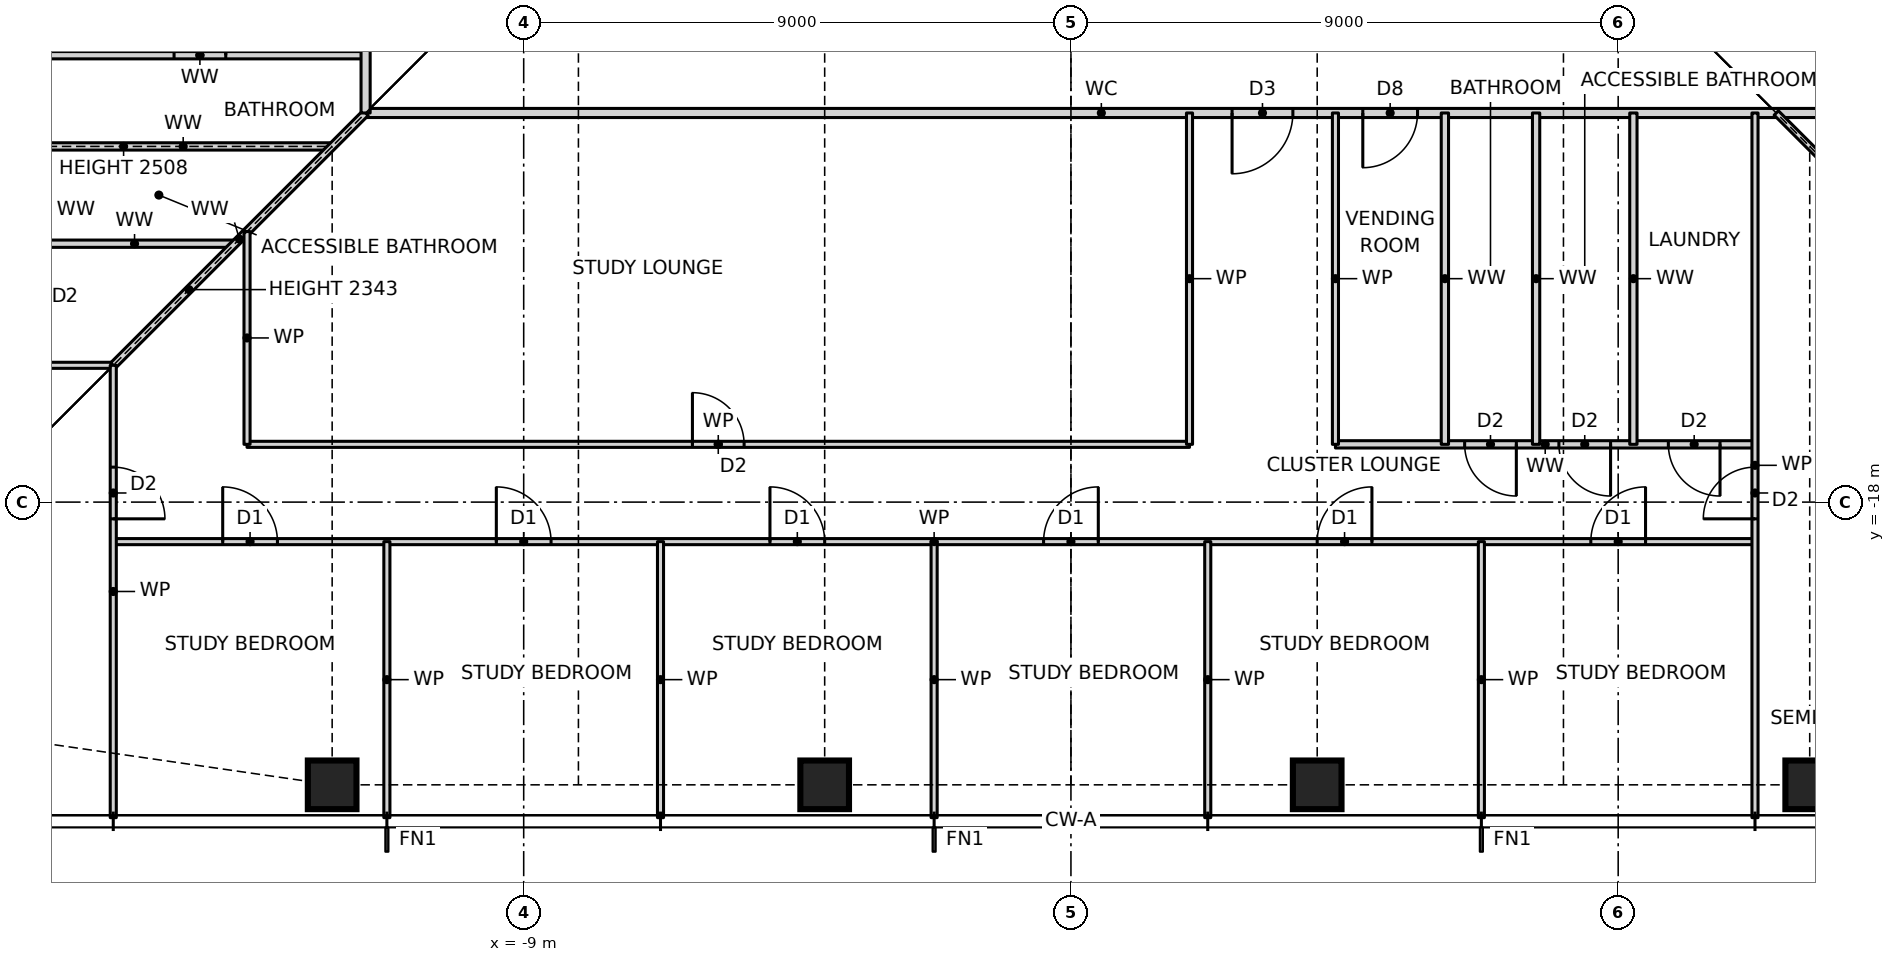
"""IFC4 building model, lengths in metres.
Left out: names, types, materials, properties, quantities, classifications, styles, units other than length and angle.
Written with IfcOpenShell. Run it as: python <this file> out.ifc"""

import sys

from ifc_helpers import new_model, si_unit, direction, frame, frame_2d, origin, origin_2d, place, context, subcontext, project, spatial, rectangle, hollow_rectangle, extrude, element, fill, save


model = new_model("IFC4")
c1 = context("Model", 3, precision=1e-05, world=origin(), true_north=direction((0.0, 1.0)))
c2 = subcontext(c1, "Body", "Model", "MODEL_VIEW")
j1 = project(units=[si_unit("LENGTHUNIT", "METRE"), si_unit("PLANEANGLEUNIT", "RADIAN")], contexts=[c1])
p1 = place(None, origin())
s1 = spatial("IfcSite", under=j1, at=p1, CompositionType="ELEMENT")
p2 = place(p1, origin())
s2 = spatial("IfcBuilding", under=s1, at=p2, CompositionType="ELEMENT")
p3 = place(p2, frame((0.0, 0.0, 32.5)))
s3 = spatial("IfcBuildingStorey", under=s2, at=p3, CompositionType="ELEMENT", Elevation=32.5)
for number, where, z_axis, x_axis in (
    (1, (-12.15, -22.65, 0.0), (0.0, 0.0, 1.0), (1.0, 0.0, 0.0)),
    (2, (-4.05, -22.65, 0.0), (0.0, 0.0, 1.0), (1.0, 0.0, 0.0)),
    (3, (4.05, -22.65, 0.0), (0.0, 0.0, 1.0), (1.0, 0.0, 0.0)),
    (4, (12.15, -22.65, 0.0), (0.0, 0.0, 1.0), (1.0, 0.0, 0.0)),
):
    element("IfcColumn", number, at=place(p3, frame(where, z_axis=z_axis, x_axis=x_axis)), inside=s3, PredefinedType="COLUMN", context=c2, shape_type="SweptSolid", body=[
        extrude(hollow_rectangle(XDim=0.8, YDim=0.8, WallThickness=0.09, at=origin_2d()), origin(), (0.0, 0.0, 1.0), 3.5),
    ])
p4 = place(p3, frame((-15.75, -18.65, 0.0), z_axis=(0.0, 0.0, 1.0), x_axis=(1.0, 0.0, 0.0)))
e5 = element("IfcWall", 5, at=p4, inside=s3, PredefinedType="PARTITIONING", context=c2, shape_type="SweptSolid", body=[
    extrude(rectangle(XDim=27.0, YDim=0.1, at=frame_2d((13.5, 0.0))), origin(), (0.0, 0.0, 1.0), 3.27),
])
p5 = place(p4, frame((1.8, 0.0, 0.0)))
e6 = element("IfcOpeningElement", 6, at=p5, cuts=e5, PredefinedType="OPENING", context=c2, shape_type="SweptSolid", body=[
    extrude(rectangle(XDim=0.9, YDim=2.1, at=frame_2d((0.45, 1.05))), frame((0.0, 0.06, 0.0), z_axis=(0.0, -1.0, 0.0), x_axis=(1.0, 0.0, 0.0)), (0.0, 0.0, 1.0), 0.12),
])
p6 = place(p4, frame((6.3, 0.0, 0.0)))
e7 = element("IfcOpeningElement", 7, at=p6, cuts=e5, PredefinedType="OPENING", context=c2, shape_type="SweptSolid", body=[
    extrude(rectangle(XDim=0.9, YDim=2.1, at=frame_2d((0.45, 1.05))), frame((0.0, 0.06, 0.0), z_axis=(0.0, -1.0, 0.0), x_axis=(1.0, 0.0, 0.0)), (0.0, 0.0, 1.0), 0.12),
])
p7 = place(p4, frame((10.8, 0.0, 0.0)))
e8 = element("IfcOpeningElement", 8, at=p7, cuts=e5, PredefinedType="OPENING", context=c2, shape_type="SweptSolid", body=[
    extrude(rectangle(XDim=0.9, YDim=2.1, at=frame_2d((0.45, 1.05))), frame((0.0, 0.06, 0.0), z_axis=(0.0, -1.0, 0.0), x_axis=(1.0, 0.0, 0.0)), (0.0, 0.0, 1.0), 0.12),
])
p8 = place(p4, frame((15.3, 0.0, 0.0)))
e9 = element("IfcOpeningElement", 9, at=p8, cuts=e5, PredefinedType="OPENING", context=c2, shape_type="SweptSolid", body=[
    extrude(rectangle(XDim=0.9, YDim=2.1, at=frame_2d((0.45, 1.05))), frame((0.0, 0.06, 0.0), z_axis=(0.0, -1.0, 0.0), x_axis=(1.0, 0.0, 0.0)), (0.0, 0.0, 1.0), 0.12),
])
p9 = place(p4, frame((19.8, 0.0, 0.0)))
e10 = element("IfcOpeningElement", 10, at=p9, cuts=e5, PredefinedType="OPENING", context=c2, shape_type="SweptSolid", body=[
    extrude(rectangle(XDim=0.9, YDim=2.1, at=frame_2d((0.45, 1.05))), frame((0.0, 0.06, 0.0), z_axis=(0.0, -1.0, 0.0), x_axis=(1.0, 0.0, 0.0)), (0.0, 0.0, 1.0), 0.12),
])
p10 = place(p4, frame((24.3, 0.0, 0.0)))
e11 = element("IfcOpeningElement", 11, at=p10, cuts=e5, PredefinedType="OPENING", context=c2, shape_type="SweptSolid", body=[
    extrude(rectangle(XDim=0.9, YDim=2.1, at=frame_2d((0.45, 1.05))), frame((0.0, 0.06, 0.0), z_axis=(0.0, -1.0, 0.0), x_axis=(1.0, 0.0, 0.0)), (0.0, 0.0, 1.0), 0.12),
])
p11 = place(p3, frame((-13.55, -17.05, 0.0), z_axis=(0.0, 0.0, 1.0), x_axis=(1.0, 0.0, 0.0)))
e12 = element("IfcWall", 12, at=p11, inside=s3, PredefinedType="PARTITIONING", context=c2, shape_type="SweptSolid", body=[
    extrude(rectangle(XDim=15.5, YDim=0.1, at=frame_2d((7.75, 0.0))), origin(), (0.0, 0.0, 1.0), 3.27),
])
p12 = place(p11, frame((7.325, 0.0, 0.0)))
e13 = element("IfcOpeningElement", 13, at=p12, cuts=e12, PredefinedType="OPENING", context=c2, shape_type="SweptSolid", body=[
    extrude(rectangle(XDim=0.85, YDim=2.1, at=frame_2d((0.425, 1.05))), frame((0.0, 0.06, 0.0), z_axis=(0.0, -1.0, 0.0), x_axis=(1.0, 0.0, 0.0)), (0.0, 0.0, 1.0), 0.12),
])
p13 = place(p3, frame((4.35, -17.05, 0.0), z_axis=(0.0, 0.0, 1.0), x_axis=(1.0, 0.0, 0.0)))
e14 = element("IfcWall", 14, at=p13, inside=s3, PredefinedType="PARTITIONING", context=c2, shape_type="SweptSolid", body=[
    extrude(rectangle(XDim=6.9, YDim=0.12, at=frame_2d((3.45, 0.0))), origin(), (0.0, 0.0, 1.0), 3.27),
])
p14 = place(p13, frame((2.125, 0.0, 0.0)))
e15 = element("IfcOpeningElement", 15, at=p14, cuts=e14, PredefinedType="OPENING", context=c2, shape_type="SweptSolid", body=[
    extrude(rectangle(XDim=0.85, YDim=2.1, at=frame_2d((0.425, 1.05))), frame((0.0, 0.07, 0.0), z_axis=(0.0, -1.0, 0.0), x_axis=(1.0, 0.0, 0.0)), (0.0, 0.0, 1.0), 0.14),
])
p15 = place(p13, frame((3.675, 0.0, 0.0)))
e16 = element("IfcOpeningElement", 16, at=p15, cuts=e14, PredefinedType="OPENING", context=c2, shape_type="SweptSolid", body=[
    extrude(rectangle(XDim=0.85, YDim=2.1, at=frame_2d((0.425, 1.05))), frame((0.0, 0.07, 0.0), z_axis=(0.0, -1.0, 0.0), x_axis=(1.0, 0.0, 0.0)), (0.0, 0.0, 1.0), 0.14),
])
p16 = place(p13, frame((5.475, 0.0, 0.0)))
e17 = element("IfcOpeningElement", 17, at=p16, cuts=e14, PredefinedType="OPENING", context=c2, shape_type="SweptSolid", body=[
    extrude(rectangle(XDim=0.85, YDim=2.1, at=frame_2d((0.425, 1.05))), frame((0.0, 0.07, 0.0), z_axis=(0.0, -1.0, 0.0), x_axis=(1.0, 0.0, 0.0)), (0.0, 0.0, 1.0), 0.14),
])
p17 = place(p3, frame((-23.19, -15.75, 0.0), z_axis=(0.0, 0.0, 1.0), x_axis=(1.0, 0.0, 0.0)))
e18 = element("IfcWall", 18, at=p17, inside=s3, PredefinedType="PARTITIONING", context=c2, shape_type="SweptSolid", body=[
    extrude(rectangle(XDim=7.44, YDim=0.1, at=frame_2d((3.72, 0.0))), origin(), (0.0, 0.0, 1.0), 3.27),
])
p18 = place(p3, frame((-17.05, -13.75, 0.0), z_axis=(0.0, 0.0, 1.0), x_axis=(1.0, 0.0, 0.0)))
e19 = element("IfcWall", 19, at=p18, inside=s3, PredefinedType="PARTITIONING", context=c2, shape_type="SweptSolid", body=[
    extrude(rectangle(XDim=3.3, YDim=0.12, at=frame_2d((1.65, 0.0))), origin(), (0.0, 0.0, 1.0), 3.27),
])
p19 = place(p3, frame((-17.05, -12.15, 0.0), z_axis=(0.0, 0.0, 1.0), x_axis=(1.0, 0.0, 0.0)))
e20 = element("IfcWall", 20, at=p19, inside=s3, PredefinedType="PARTITIONING", context=c2, shape_type="SweptSolid", body=[
    extrude(rectangle(XDim=4.9, YDim=0.12, at=frame_2d((2.45, 0.0))), origin(), (0.0, 0.0, 1.0), 2.508),
])
p20 = place(p3, frame((-11.6, -11.6, 0.0), z_axis=(0.0, 0.0, 1.0), x_axis=(1.0, 0.0, 0.0)))
e21 = element("IfcWall", 21, at=p20, inside=s3, PredefinedType="PARTITIONING", context=c2, shape_type="SweptSolid", body=[
    extrude(rectangle(XDim=24.2, YDim=0.15, at=frame_2d((12.1, 0.0))), origin(), (0.0, 0.0, 1.0), 3.27),
])
p21 = place(p20, frame((14.25, 0.0, 0.0)))
e22 = element("IfcOpeningElement", 22, at=p21, cuts=e21, PredefinedType="OPENING", context=c2, shape_type="SweptSolid", body=[
    extrude(rectangle(XDim=1.0, YDim=2.1, at=frame_2d((0.5, 1.05))), frame((0.0, 0.085, 0.0), z_axis=(0.0, -1.0, 0.0), x_axis=(1.0, 0.0, 0.0)), (0.0, 0.0, 1.0), 0.17),
])
p22 = place(p20, frame((16.4, 0.0, 0.0)))
e23 = element("IfcOpeningElement", 23, at=p22, cuts=e21, PredefinedType="OPENING", context=c2, shape_type="SweptSolid", body=[
    extrude(rectangle(XDim=0.9, YDim=2.1, at=frame_2d((0.45, 1.05))), frame((0.0, 0.085, 0.0), z_axis=(0.0, -1.0, 0.0), x_axis=(1.0, 0.0, 0.0)), (0.0, 0.0, 1.0), 0.17),
])
p23 = place(p3, frame((-17.05, -10.65, 0.0), z_axis=(0.0, 0.0, 1.0), x_axis=(1.0, 0.0, 0.0)))
e24 = element("IfcWall", 24, at=p23, inside=s3, PredefinedType="PARTITIONING", context=c2, shape_type="SweptSolid", body=[
    extrude(rectangle(XDim=5.45, YDim=0.12, at=frame_2d((2.725, 0.0))), origin(), (0.0, 0.0, 1.0), 3.27),
])
p24 = place(p23, frame((2.3, 0.0, 0.0)))
e25 = element("IfcOpeningElement", 25, at=p24, cuts=e24, PredefinedType="OPENING", context=c2, shape_type="SweptSolid", body=[
    extrude(rectangle(XDim=0.85, YDim=2.1, at=frame_2d((0.425, 1.05))), frame((0.0, 0.07, 0.0), z_axis=(0.0, -1.0, 0.0), x_axis=(1.0, 0.0, 0.0)), (0.0, 0.0, 1.0), 0.14),
])
p25 = place(p3, frame((-15.75, -15.75, 0.0), z_axis=(0.0, 0.0, 1.0), x_axis=(0.707106781187, 0.707106781187, 0.0)))
e26 = element("IfcWall", 26, at=p25, inside=s3, PredefinedType="PARTITIONING", context=c2, shape_type="SweptSolid", body=[
    extrude(rectangle(XDim=5.869, YDim=0.12, at=frame_2d((2.935, 0.0))), origin(), (0.0, 0.0, 1.0), 2.343),
])
p26 = place(p3, frame((11.25, -23.19, 0.0), z_axis=(0.0, 0.0, 1.0), x_axis=(0.0, 1.0, 0.0)))
e27 = element("IfcWall", 27, at=p26, inside=s3, PredefinedType="PARTITIONING", context=c2, shape_type="SweptSolid", body=[
    extrude(rectangle(XDim=11.59, YDim=0.1, at=frame_2d((5.795, 0.0))), origin(), (0.0, 0.0, 1.0), 3.27),
])
p27 = place(p26, frame((4.915, 0.0, 0.0)))
e28 = element("IfcOpeningElement", 28, at=p27, cuts=e27, PredefinedType="OPENING", context=c2, shape_type="SweptSolid", body=[
    extrude(rectangle(XDim=0.85, YDim=2.1, at=frame_2d((0.425, 1.05))), frame((0.0, 0.06, 0.0), z_axis=(0.0, -1.0, 0.0), x_axis=(1.0, 0.0, 0.0)), (0.0, 0.0, 1.0), 0.12),
])
for number, where, z_axis, x_axis in (
    (29, (9.25, -17.05, 0.0), (0.0, 0.0, 1.0), (0.0, 1.0, 0.0)),
    (30, (7.65, -17.05, 0.0), (0.0, 0.0, 1.0), (0.0, 1.0, 0.0)),
):
    element("IfcWall", number, at=place(p3, frame(where, z_axis=z_axis, x_axis=x_axis)), inside=s3, PredefinedType="PARTITIONING", context=c2, shape_type="SweptSolid", body=[
        extrude(rectangle(XDim=5.45, YDim=0.12, at=frame_2d((2.725, 0.0))), origin(), (0.0, 0.0, 1.0), 3.27),
    ])
p28 = place(p3, frame((6.75, -23.19, 0.0), z_axis=(0.0, 0.0, 1.0), x_axis=(0.0, 1.0, 0.0)))
e31 = element("IfcWall", 31, at=p28, inside=s3, PredefinedType="PARTITIONING", context=c2, shape_type="SweptSolid", body=[
    extrude(rectangle(XDim=4.54, YDim=0.1, at=frame_2d((2.27, 0.0))), origin(), (0.0, 0.0, 1.0), 3.27),
])
p29 = place(p3, frame((6.15, -17.05, 0.0), z_axis=(0.0, 0.0, 1.0), x_axis=(0.0, 1.0, 0.0)))
e32 = element("IfcWall", 32, at=p29, inside=s3, PredefinedType="PARTITIONING", context=c2, shape_type="SweptSolid", body=[
    extrude(rectangle(XDim=5.45, YDim=0.12, at=frame_2d((2.725, 0.0))), origin(), (0.0, 0.0, 1.0), 3.27),
])
p30 = place(p3, frame((4.35, -17.05, 0.0), z_axis=(0.0, 0.0, 1.0), x_axis=(0.0, 1.0, 0.0)))
e33 = element("IfcWall", 33, at=p30, inside=s3, PredefinedType="PARTITIONING", context=c2, shape_type="SweptSolid", body=[
    extrude(rectangle(XDim=5.45, YDim=0.1, at=frame_2d((2.725, 0.0))), origin(), (0.0, 0.0, 1.0), 3.27),
])
p31 = place(p3, frame((2.25, -23.19, 0.0), z_axis=(0.0, 0.0, 1.0), x_axis=(0.0, 1.0, 0.0)))
e34 = element("IfcWall", 34, at=p31, inside=s3, PredefinedType="PARTITIONING", context=c2, shape_type="SweptSolid", body=[
    extrude(rectangle(XDim=4.54, YDim=0.1, at=frame_2d((2.27, 0.0))), origin(), (0.0, 0.0, 1.0), 3.27),
])
p32 = place(p3, frame((1.95, -17.05, 0.0), z_axis=(0.0, 0.0, 1.0), x_axis=(0.0, 1.0, 0.0)))
e35 = element("IfcWall", 35, at=p32, inside=s3, PredefinedType="PARTITIONING", context=c2, shape_type="SweptSolid", body=[
    extrude(rectangle(XDim=5.45, YDim=0.1, at=frame_2d((2.725, 0.0))), origin(), (0.0, 0.0, 1.0), 3.27),
])
for number, where, z_axis, x_axis in (
    (36, (-2.25, -23.19, 0.0), (0.0, 0.0, 1.0), (0.0, 1.0, 0.0)),
    (37, (-6.75, -23.19, 0.0), (0.0, 0.0, 1.0), (0.0, 1.0, 0.0)),
    (38, (-11.25, -23.19, 0.0), (0.0, 0.0, 1.0), (0.0, 1.0, 0.0)),
):
    element("IfcWall", number, at=place(p3, frame(where, z_axis=z_axis, x_axis=x_axis)), inside=s3, PredefinedType="PARTITIONING", context=c2, shape_type="SweptSolid", body=[
        extrude(rectangle(XDim=4.54, YDim=0.1, at=frame_2d((2.27, 0.0))), origin(), (0.0, 0.0, 1.0), 3.27),
    ])
p33 = place(p3, frame((-11.6, -11.6, 0.0), z_axis=(0.0, 0.0, 1.0), x_axis=(0.0, 1.0, 0.0)))
e39 = element("IfcWall", 39, at=p33, inside=s3, PredefinedType="PARTITIONING", context=c2, shape_type="SweptSolid", body=[
    extrude(rectangle(XDim=23.2, YDim=0.15, at=frame_2d((11.6, 0.0))), origin(), (0.0, 0.0, 1.0), 3.27),
])
p34 = place(p33, frame((1.65, 0.0, 0.0)))
e40 = element("IfcOpeningElement", 40, at=p34, cuts=e39, PredefinedType="OPENING", context=c2, shape_type="SweptSolid", body=[
    extrude(rectangle(XDim=1.0, YDim=2.1, at=frame_2d((0.5, 1.05))), frame((0.0, 0.085, 0.0), z_axis=(0.0, -1.0, 0.0), x_axis=(1.0, 0.0, 0.0)), (0.0, 0.0, 1.0), 0.17),
])
p35 = place(p3, frame((-13.55, -17.05, 0.0), z_axis=(0.0, 0.0, 1.0), x_axis=(0.0, 1.0, 0.0)))
e41 = element("IfcWall", 41, at=p35, inside=s3, PredefinedType="PARTITIONING", context=c2, shape_type="SweptSolid", body=[
    extrude(rectangle(XDim=3.5, YDim=0.1, at=frame_2d((1.75, 0.0))), origin(), (0.0, 0.0, 1.0), 3.27),
])
p36 = place(p3, frame((-15.75, -23.19, 0.0), z_axis=(0.0, 0.0, 1.0), x_axis=(0.0, 1.0, 0.0)))
e42 = element("IfcWall", 42, at=p36, inside=s3, PredefinedType="PARTITIONING", context=c2, shape_type="SweptSolid", body=[
    extrude(rectangle(XDim=7.44, YDim=0.1, at=frame_2d((3.72, 0.0))), origin(), (0.0, 0.0, 1.0), 3.27),
])
p37 = place(p36, frame((4.915, 0.0, 0.0)))
e43 = element("IfcOpeningElement", 43, at=p37, cuts=e42, PredefinedType="OPENING", context=c2, shape_type="SweptSolid", body=[
    extrude(rectangle(XDim=0.85, YDim=2.1, at=frame_2d((0.425, 1.05))), frame((0.0, 0.06, 0.0), z_axis=(0.0, -1.0, 0.0), x_axis=(1.0, 0.0, 0.0)), (0.0, 0.0, 1.0), 0.12),
])
p38 = place(p3, frame((15.75, -15.75, 0.0), z_axis=(0.0, 0.0, 1.0), x_axis=(-0.707106781187, 0.707106781187, 0.0)))
e44 = element("IfcWall", 44, at=p38, inside=s3, PredefinedType="PARTITIONING", context=c2, shape_type="SweptSolid", body=[
    extrude(rectangle(XDim=5.869, YDim=0.1, at=frame_2d((2.935, 0.0))), origin(), (0.0, 0.0, 1.0), 2.343),
])
p39 = place(p5, origin())
e45 = element("IfcDoor", 45, at=p39, inside=s3, OperationType="SINGLE_SWING_LEFT", PredefinedType="DOOR", context=c2, shape_type="SweptSolid", body=[
    extrude(rectangle(XDim=0.9, YDim=2.1, at=frame_2d((0.45, 1.05))), frame((0.0, 0.025, 0.0), z_axis=(0.0, -1.0, 0.0), x_axis=(1.0, 0.0, 0.0)), (0.0, 0.0, 1.0), 0.05),
])
fill(e6, e45)
p40 = place(p6, origin())
e46 = element("IfcDoor", 46, at=p40, inside=s3, OperationType="SINGLE_SWING_LEFT", PredefinedType="DOOR", context=c2, shape_type="SweptSolid", body=[
    extrude(rectangle(XDim=0.9, YDim=2.1, at=frame_2d((0.45, 1.05))), frame((0.0, 0.025, 0.0), z_axis=(0.0, -1.0, 0.0), x_axis=(1.0, 0.0, 0.0)), (0.0, 0.0, 1.0), 0.05),
])
fill(e7, e46)
p41 = place(p7, origin())
e47 = element("IfcDoor", 47, at=p41, inside=s3, OperationType="SINGLE_SWING_LEFT", PredefinedType="DOOR", context=c2, shape_type="SweptSolid", body=[
    extrude(rectangle(XDim=0.9, YDim=2.1, at=frame_2d((0.45, 1.05))), frame((0.0, 0.025, 0.0), z_axis=(0.0, -1.0, 0.0), x_axis=(1.0, 0.0, 0.0)), (0.0, 0.0, 1.0), 0.05),
])
fill(e8, e47)
p42 = place(p8, origin())
e48 = element("IfcDoor", 48, at=p42, inside=s3, OperationType="SINGLE_SWING_RIGHT", PredefinedType="DOOR", context=c2, shape_type="SweptSolid", body=[
    extrude(rectangle(XDim=0.9, YDim=2.1, at=frame_2d((0.45, 1.05))), frame((0.0, 0.025, 0.0), z_axis=(0.0, -1.0, 0.0), x_axis=(1.0, 0.0, 0.0)), (0.0, 0.0, 1.0), 0.05),
])
fill(e9, e48)
p43 = place(p9, origin())
e49 = element("IfcDoor", 49, at=p43, inside=s3, OperationType="SINGLE_SWING_RIGHT", PredefinedType="DOOR", context=c2, shape_type="SweptSolid", body=[
    extrude(rectangle(XDim=0.9, YDim=2.1, at=frame_2d((0.45, 1.05))), frame((0.0, 0.025, 0.0), z_axis=(0.0, -1.0, 0.0), x_axis=(1.0, 0.0, 0.0)), (0.0, 0.0, 1.0), 0.05),
])
fill(e10, e49)
p44 = place(p10, origin())
e50 = element("IfcDoor", 50, at=p44, inside=s3, OperationType="SINGLE_SWING_RIGHT", PredefinedType="DOOR", context=c2, shape_type="SweptSolid", body=[
    extrude(rectangle(XDim=0.9, YDim=2.1, at=frame_2d((0.45, 1.05))), frame((0.0, 0.025, 0.0), z_axis=(0.0, -1.0, 0.0), x_axis=(1.0, 0.0, 0.0)), (0.0, 0.0, 1.0), 0.05),
])
fill(e11, e50)
p45 = place(p21, frame((1.0, 0.0, 0.0), z_axis=(0.0, 0.0, 1.0), x_axis=(-1.0, 0.0, 0.0)))
e51 = element("IfcDoor", 51, at=p45, inside=s3, OperationType="SINGLE_SWING_RIGHT", PredefinedType="DOOR", context=c2, shape_type="SweptSolid", body=[
    extrude(rectangle(XDim=1.0, YDim=2.1, at=frame_2d((0.5, 1.05))), frame((0.0, 0.025, 0.0), z_axis=(0.0, -1.0, 0.0), x_axis=(1.0, 0.0, 0.0)), (0.0, 0.0, 1.0), 0.05),
])
fill(e22, e51)
p46 = place(p12, origin())
e52 = element("IfcDoor", 52, at=p46, inside=s3, OperationType="SINGLE_SWING_LEFT", PredefinedType="DOOR", context=c2, shape_type="SweptSolid", body=[
    extrude(rectangle(XDim=0.85, YDim=2.1, at=frame_2d((0.425, 1.05))), frame((0.0, 0.025, 0.0), z_axis=(0.0, -1.0, 0.0), x_axis=(1.0, 0.0, 0.0)), (0.0, 0.0, 1.0), 0.05),
])
fill(e13, e52)
p47 = place(p22, frame((0.9, 0.0, 0.0), z_axis=(0.0, 0.0, 1.0), x_axis=(-1.0, 0.0, 0.0)))
e53 = element("IfcDoor", 53, at=p47, inside=s3, OperationType="SINGLE_SWING_RIGHT", PredefinedType="DOOR", context=c2, shape_type="SweptSolid", body=[
    extrude(rectangle(XDim=0.9, YDim=2.1, at=frame_2d((0.45, 1.05))), frame((0.0, 0.025, 0.0), z_axis=(0.0, -1.0, 0.0), x_axis=(1.0, 0.0, 0.0)), (0.0, 0.0, 1.0), 0.05),
])
fill(e23, e53)
p48 = place(p14, frame((0.85, 0.0, 0.0), z_axis=(0.0, 0.0, 1.0), x_axis=(-1.0, 0.0, 0.0)))
e54 = element("IfcDoor", 54, at=p48, inside=s3, OperationType="SINGLE_SWING_LEFT", PredefinedType="DOOR", context=c2, shape_type="SweptSolid", body=[
    extrude(rectangle(XDim=0.85, YDim=2.1, at=frame_2d((0.425, 1.05))), frame((0.0, 0.025, 0.0), z_axis=(0.0, -1.0, 0.0), x_axis=(1.0, 0.0, 0.0)), (0.0, 0.0, 1.0), 0.05),
])
fill(e15, e54)
p49 = place(p15, frame((0.85, 0.0, 0.0), z_axis=(0.0, 0.0, 1.0), x_axis=(-1.0, 0.0, 0.0)))
e55 = element("IfcDoor", 55, at=p49, inside=s3, OperationType="SINGLE_SWING_LEFT", PredefinedType="DOOR", context=c2, shape_type="SweptSolid", body=[
    extrude(rectangle(XDim=0.85, YDim=2.1, at=frame_2d((0.425, 1.05))), frame((0.0, 0.025, 0.0), z_axis=(0.0, -1.0, 0.0), x_axis=(1.0, 0.0, 0.0)), (0.0, 0.0, 1.0), 0.05),
])
fill(e16, e55)
p50 = place(p16, frame((0.85, 0.0, 0.0), z_axis=(0.0, 0.0, 1.0), x_axis=(-1.0, 0.0, 0.0)))
e56 = element("IfcDoor", 56, at=p50, inside=s3, OperationType="SINGLE_SWING_LEFT", PredefinedType="DOOR", context=c2, shape_type="SweptSolid", body=[
    extrude(rectangle(XDim=0.85, YDim=2.1, at=frame_2d((0.425, 1.05))), frame((0.0, 0.025, 0.0), z_axis=(0.0, -1.0, 0.0), x_axis=(1.0, 0.0, 0.0)), (0.0, 0.0, 1.0), 0.05),
])
fill(e17, e56)
p51 = place(p27, origin())
e57 = element("IfcDoor", 57, at=p51, inside=s3, OperationType="SINGLE_SWING_LEFT", PredefinedType="DOOR", context=c2, shape_type="SweptSolid", body=[
    extrude(rectangle(XDim=0.85, YDim=2.1, at=frame_2d((0.425, 1.05))), frame((0.0, 0.025, 0.0), z_axis=(0.0, -1.0, 0.0), x_axis=(1.0, 0.0, 0.0)), (0.0, 0.0, 1.0), 0.05),
])
fill(e28, e57)
p52 = place(p24, origin())
e58 = element("IfcDoor", 58, at=p52, inside=s3, OperationType="SINGLE_SWING_RIGHT", PredefinedType="DOOR", context=c2, shape_type="SweptSolid", body=[
    extrude(rectangle(XDim=0.85, YDim=2.1, at=frame_2d((0.425, 1.05))), frame((0.0, 0.025, 0.0), z_axis=(0.0, -1.0, 0.0), x_axis=(1.0, 0.0, 0.0)), (0.0, 0.0, 1.0), 0.05),
])
fill(e25, e58)
p53 = place(p37, frame((0.85, 0.0, 0.0), z_axis=(0.0, 0.0, 1.0), x_axis=(-1.0, 0.0, 0.0)))
e59 = element("IfcDoor", 59, at=p53, inside=s3, OperationType="SINGLE_SWING_RIGHT", PredefinedType="DOOR", context=c2, shape_type="SweptSolid", body=[
    extrude(rectangle(XDim=0.85, YDim=2.1, at=frame_2d((0.425, 1.05))), frame((0.0, 0.025, 0.0), z_axis=(0.0, -1.0, 0.0), x_axis=(1.0, 0.0, 0.0)), (0.0, 0.0, 1.0), 0.05),
])
fill(e43, e59)
save(model, sys.argv[1])
